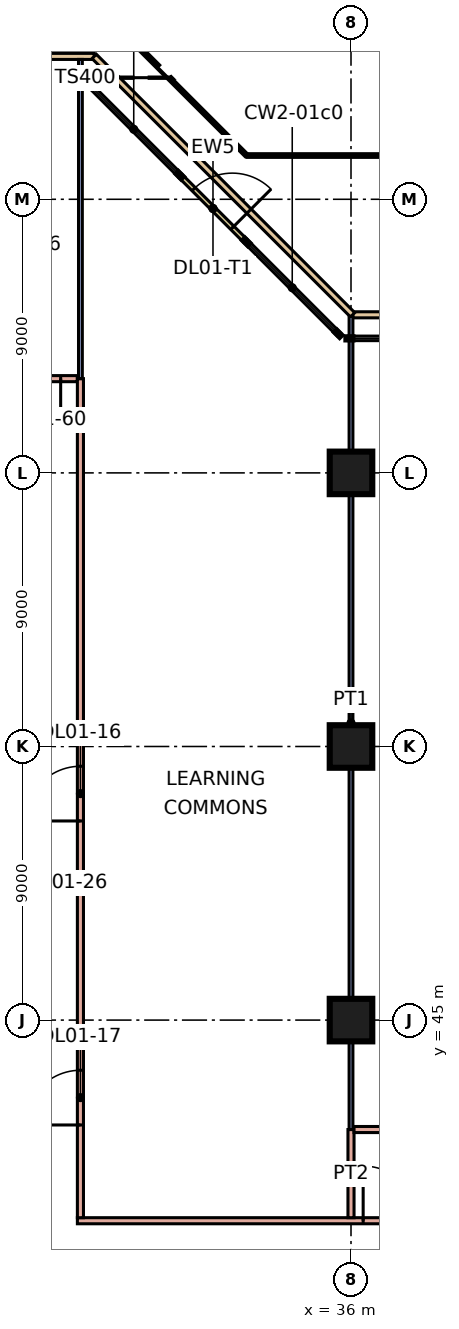
"""IFC4 building model, lengths in metres.
Left out: names, types, materials, properties, quantities, classifications, styles, units other than length and angle.
Written with IfcOpenShell. Run it as: python <this file> out.ifc"""

import sys

from ifc_helpers import new_model, si_unit, direction, frame, frame_2d, origin, origin_2d, place, context, subcontext, project, spatial, rectangle, extrude, element, fill, save


model = new_model("IFC4")
c1 = context("Model", 3, precision=1e-05, world=origin(), true_north=direction((0.0, 1.0)))
c2 = subcontext(c1, "Body", "Model", "MODEL_VIEW")
j1 = project(units=[si_unit("LENGTHUNIT", "METRE"), si_unit("PLANEANGLEUNIT", "RADIAN")], contexts=[c1])
p1 = place(None, origin())
s1 = spatial("IfcSite", under=j1, at=p1, CompositionType="ELEMENT")
p2 = place(p1, origin())
s2 = spatial("IfcBuilding", under=s1, at=p2, CompositionType="ELEMENT")
p3 = place(p2, frame((0.0, 0.0, 7.2)))
s3 = spatial("IfcBuildingStorey", under=s2, at=p3, CompositionType="ELEMENT", Elevation=7.2)
for number, where, z_axis, x_axis in (
    (1, (36.0, 45.0, 0.0), (0.0, 0.0, 1.0), (1.0, 0.0, 0.0)),
    (2, (36.0, 54.0, 0.0), (0.0, 0.0, 1.0), (1.0, 0.0, 0.0)),
    (3, (36.0, 63.0, 0.0), (0.0, 0.0, 1.0), (1.0, 0.0, 0.0)),
):
    element("IfcColumn", number, at=place(p3, frame(where, z_axis=z_axis, x_axis=x_axis)), inside=s3, PredefinedType="COLUMN", context=c2, shape_type="SweptSolid", body=[
        extrude(rectangle(XDim=1.4, YDim=1.4, at=origin_2d()), origin(), (0.0, 0.0, 1.0), 4.8),
    ])
p4 = place(p3, frame((32.521, 70.636, 0.0), z_axis=(0.0, 0.0, 1.0), x_axis=(-0.707106781187, 0.707106781187, 0.0)))
e4 = element("IfcWall", 4, at=p4, inside=s3, PredefinedType="SOLIDWALL", context=c2, shape_type="SweptSolid", body=[
    extrude(rectangle(XDim=3.0, YDim=0.15, at=frame_2d((1.5, 0.0))), origin(), (0.0, 0.0, 1.0), 4.4),
])
p5 = place(p4, frame((0.6, 0.0, 0.0)))
e5 = element("IfcOpeningElement", 5, at=p5, cuts=e4, PredefinedType="OPENING", context=c2, shape_type="SweptSolid", body=[
    extrude(rectangle(XDim=1.8, YDim=2.4, at=frame_2d((0.9, 1.2))), frame((0.0, 0.085, 0.0), z_axis=(0.0, -1.0, 0.0), x_axis=(1.0, 0.0, 0.0)), (0.0, 0.0, 1.0), 0.17),
])
p6 = place(p3, frame((36.053, 68.2, 0.0), z_axis=(0.0, 0.0, 1.0), x_axis=(1.0, 0.0, 0.0)))
e6 = element("IfcWall", 6, at=p6, inside=s3, PredefinedType="PARAPET", context=c2, shape_type="SweptSolid", body=[
    extrude(rectangle(XDim=32.146, YDim=0.2, at=frame_2d((16.073, 0.0))), origin(), (0.0, 0.0, 1.0), 0.5),
])
p7 = place(p3, frame((-3.553, 76.7, 0.0), z_axis=(0.0, 0.0, 1.0), x_axis=(1.0, 0.0, 0.0)))
e7 = element("IfcWall", 7, at=p7, inside=s3, PredefinedType="PARAPET", context=c2, shape_type="SweptSolid", body=[
    extrude(rectangle(XDim=31.107, YDim=0.2, at=frame_2d((15.553, 0.0))), origin(), (0.0, 0.0, 1.0), 0.5),
])
p8 = place(p3, frame((27.553, 76.7, 0.0), z_axis=(0.0, 0.0, 1.0), x_axis=(0.707106781187, -0.707106781187, 0.0)))
e8 = element("IfcWall", 8, at=p8, inside=s3, PredefinedType="PARAPET", context=c2, shape_type="SweptSolid", body=[
    extrude(rectangle(XDim=12.021, YDim=0.2, at=frame_2d((6.01, 0.0))), origin(), (0.0, 0.0, 1.0), 0.5),
])
p9 = place(p3, frame((-3.0, 66.1, 0.0), z_axis=(0.0, 0.0, 1.0), x_axis=(1.0, 0.0, 0.0)))
e9 = element("IfcWall", 9, at=p9, inside=s3, PredefinedType="PARTITIONING", context=c2, shape_type="SweptSolid", body=[
    extrude(rectangle(XDim=30.0, YDim=0.2, at=frame_2d((15.0, 0.0))), origin(), (0.0, 0.0, 1.0), 4.4),
])
p10 = place(p9, frame((0.65, 0.0, 0.0)))
e10 = element("IfcOpeningElement", 10, at=p10, cuts=e9, PredefinedType="OPENING", context=c2, shape_type="SweptSolid", body=[
    extrude(rectangle(XDim=1.0, YDim=2.1, at=frame_2d((0.5, 1.05))), frame((0.0, 0.11, 0.0), z_axis=(0.0, -1.0, 0.0), x_axis=(1.0, 0.0, 0.0)), (0.0, 0.0, 1.0), 0.22),
])
p11 = place(p9, frame((8.6, 0.0, 0.0)))
e11 = element("IfcOpeningElement", 11, at=p11, cuts=e9, PredefinedType="OPENING", context=c2, shape_type="SweptSolid", body=[
    extrude(rectangle(XDim=1.0, YDim=2.1, at=frame_2d((0.5, 1.05))), frame((0.0, 0.11, 0.0), z_axis=(0.0, -1.0, 0.0), x_axis=(1.0, 0.0, 0.0)), (0.0, 0.0, 1.0), 0.22),
])
p12 = place(p9, frame((13.85, 0.0, 0.0)))
e12 = element("IfcOpeningElement", 12, at=p12, cuts=e9, PredefinedType="OPENING", context=c2, shape_type="SweptSolid", body=[
    extrude(rectangle(XDim=1.0, YDim=2.1, at=frame_2d((0.5, 1.05))), frame((0.0, 0.11, 0.0), z_axis=(0.0, -1.0, 0.0), x_axis=(1.0, 0.0, 0.0)), (0.0, 0.0, 1.0), 0.22),
])
p13 = place(p9, frame((22.35, 0.0, 0.0)))
e13 = element("IfcOpeningElement", 13, at=p13, cuts=e9, PredefinedType="OPENING", context=c2, shape_type="SweptSolid", body=[
    extrude(rectangle(XDim=1.0, YDim=2.1, at=frame_2d((0.5, 1.05))), frame((0.0, 0.11, 0.0), z_axis=(0.0, -1.0, 0.0), x_axis=(1.0, 0.0, 0.0)), (0.0, 0.0, 1.0), 0.22),
])
p14 = place(p9, frame((25.85, 0.0, 0.0)))
e14 = element("IfcOpeningElement", 14, at=p14, cuts=e9, PredefinedType="OPENING", context=c2, shape_type="SweptSolid", body=[
    extrude(rectangle(XDim=1.0, YDim=2.1, at=frame_2d((0.5, 1.05))), frame((0.0, 0.11, 0.0), z_axis=(0.0, -1.0, 0.0), x_axis=(1.0, 0.0, 0.0)), (0.0, 0.0, 1.0), 0.22),
])
p15 = place(p9, frame((28.45, 0.0, 0.0)))
e15 = element("IfcOpeningElement", 15, at=p15, cuts=e9, PredefinedType="OPENING", context=c2, shape_type="SweptSolid", body=[
    extrude(rectangle(XDim=1.0, YDim=2.1, at=frame_2d((0.5, 1.05))), frame((0.0, 0.11, 0.0), z_axis=(0.0, -1.0, 0.0), x_axis=(1.0, 0.0, 0.0)), (0.0, 0.0, 1.0), 0.22),
])
p16 = place(p3, frame((27.0, 38.4, 0.0), z_axis=(0.0, 0.0, 1.0), x_axis=(1.0, 0.0, 0.0)))
e16 = element("IfcWall", 16, at=p16, inside=s3, PredefinedType="PARTITIONING", context=c2, shape_type="SweptSolid", body=[
    extrude(rectangle(XDim=41.1, YDim=0.2, at=frame_2d((20.55, 0.0))), origin(), (0.0, 0.0, 1.0), 4.4),
])
p17 = place(p16, frame((21.9, 0.0, 0.0)))
e17 = element("IfcOpeningElement", 17, at=p17, cuts=e16, PredefinedType="OPENING", context=c2, shape_type="SweptSolid", body=[
    extrude(rectangle(XDim=1.0, YDim=2.1, at=frame_2d((0.5, 1.05))), frame((0.0, 0.11, 0.0), z_axis=(0.0, -1.0, 0.0), x_axis=(1.0, 0.0, 0.0)), (0.0, 0.0, 1.0), 0.22),
])
p18 = place(p16, frame((30.9, 0.0, 0.0)))
e18 = element("IfcOpeningElement", 18, at=p18, cuts=e16, PredefinedType="OPENING", context=c2, shape_type="SweptSolid", body=[
    extrude(rectangle(XDim=1.0, YDim=2.1, at=frame_2d((0.5, 1.05))), frame((0.0, 0.11, 0.0), z_axis=(0.0, -1.0, 0.0), x_axis=(1.0, 0.0, 0.0)), (0.0, 0.0, 1.0), 0.22),
])
p19 = place(p16, frame((37.65, 0.0, 0.0)))
e19 = element("IfcOpeningElement", 19, at=p19, cuts=e16, PredefinedType="OPENING", context=c2, shape_type="SweptSolid", body=[
    extrude(rectangle(XDim=1.0, YDim=2.1, at=frame_2d((0.5, 1.05))), frame((0.0, 0.11, 0.0), z_axis=(0.0, -1.0, 0.0), x_axis=(1.0, 0.0, 0.0)), (0.0, 0.0, 1.0), 0.22),
])
p20 = place(p16, frame((9.4, 0.0, 0.0)))
e20 = element("IfcOpeningElement", 20, at=p20, cuts=e16, PredefinedType="OPENING", context=c2, shape_type="SweptSolid", body=[
    extrude(rectangle(XDim=1.8, YDim=2.1, at=frame_2d((0.9, 1.05))), frame((0.0, 0.11, 0.0), z_axis=(0.0, -1.0, 0.0), x_axis=(1.0, 0.0, 0.0)), (0.0, 0.0, 1.0), 0.22),
])
p21 = place(p3, frame((27.1, 38.5, 0.0), z_axis=(0.0, 0.0, 1.0), x_axis=(0.0, 1.0, 0.0)))
e21 = element("IfcWall", 21, at=p21, inside=s3, PredefinedType="PARTITIONING", context=c2, shape_type="SweptSolid", body=[
    extrude(rectangle(XDim=27.6, YDim=0.2, at=frame_2d((13.8, 0.0))), origin(), (0.0, 0.0, 1.0), 4.4),
])
p22 = place(p21, frame((13.05, 0.0, 0.0)))
e22 = element("IfcOpeningElement", 22, at=p22, cuts=e21, PredefinedType="OPENING", context=c2, shape_type="SweptSolid", body=[
    extrude(rectangle(XDim=1.8, YDim=2.1, at=frame_2d((0.9, 1.05))), frame((0.0, 0.11, 0.0), z_axis=(0.0, -1.0, 0.0), x_axis=(1.0, 0.0, 0.0)), (0.0, 0.0, 1.0), 0.22),
])
p23 = place(p21, frame((3.05, 0.0, 0.0)))
e23 = element("IfcOpeningElement", 23, at=p23, cuts=e21, PredefinedType="OPENING", context=c2, shape_type="SweptSolid", body=[
    extrude(rectangle(XDim=1.8, YDim=2.1, at=frame_2d((0.9, 1.05))), frame((0.0, 0.11, 0.0), z_axis=(0.0, -1.0, 0.0), x_axis=(1.0, 0.0, 0.0)), (0.0, 0.0, 1.0), 0.22),
])
p24 = place(p3, frame((27.1, 66.1, 0.0), z_axis=(0.0, 0.0, 1.0), x_axis=(0.0, 1.0, 0.0)))
e24 = element("IfcWall", 24, at=p24, inside=s3, PredefinedType="PARTITIONING", context=c2, shape_type="SweptSolid", body=[
    extrude(rectangle(XDim=10.5, YDim=0.125, at=frame_2d((5.25, 0.0))), origin(), (0.0, 0.0, 1.0), 4.4),
])
p25 = place(p3, frame((36.0, 38.5, 0.0), z_axis=(0.0, 0.0, 1.0), x_axis=(0.0, 1.0, 0.0)))
e25 = element("IfcWall", 25, at=p25, inside=s3, PredefinedType="PARTITIONING", context=c2, shape_type="SweptSolid", body=[
    extrude(rectangle(XDim=2.9, YDim=0.2, at=frame_2d((1.45, 0.0))), origin(), (0.0, 0.0, 1.0), 4.4),
])
p26 = place(p3, frame((36.0, 41.4, 0.0), z_axis=(0.0, 0.0, 1.0), x_axis=(0.0, 1.0, 0.0)))
e26 = element("IfcWall", 26, at=p26, inside=s3, PredefinedType="PARTITIONING", context=c2, shape_type="SweptSolid", body=[
    extrude(rectangle(XDim=26.747, YDim=0.125, at=frame_2d((13.373, 0.0))), origin(), (0.0, 0.0, 1.0), 4.4),
])
p27 = place(p3, frame((36.1, 41.4, 0.0), z_axis=(0.0, 0.0, 1.0), x_axis=(1.0, 0.0, 0.0)))
e27 = element("IfcWall", 27, at=p27, inside=s3, PredefinedType="PARTITIONING", context=c2, shape_type="SweptSolid", body=[
    extrude(rectangle(XDim=32.0, YDim=0.2, at=frame_2d((16.0, 0.0))), origin(), (0.0, 0.0, 1.0), 4.4),
])
p28 = place(p27, frame((3.45, 0.0, 0.0)))
e28 = element("IfcOpeningElement", 28, at=p28, cuts=e27, PredefinedType="OPENING", context=c2, shape_type="SweptSolid", body=[
    extrude(rectangle(XDim=1.8, YDim=2.1, at=frame_2d((0.9, 1.05))), frame((0.0, 0.11, 0.0), z_axis=(0.0, -1.0, 0.0), x_axis=(1.0, 0.0, 0.0)), (0.0, 0.0, 1.0), 0.22),
])
p29 = place(p27, frame((6.95, 0.0, 0.0)))
e29 = element("IfcOpeningElement", 29, at=p29, cuts=e27, PredefinedType="OPENING", context=c2, shape_type="SweptSolid", body=[
    extrude(rectangle(XDim=1.8, YDim=2.1, at=frame_2d((0.9, 1.05))), frame((0.0, 0.11, 0.0), z_axis=(0.0, -1.0, 0.0), x_axis=(1.0, 0.0, 0.0)), (0.0, 0.0, 1.0), 0.22),
])
p30 = place(p27, frame((12.45, 0.0, 0.0)))
e30 = element("IfcOpeningElement", 30, at=p30, cuts=e27, PredefinedType="OPENING", context=c2, shape_type="SweptSolid", body=[
    extrude(rectangle(XDim=1.8, YDim=2.1, at=frame_2d((0.9, 1.05))), frame((0.0, 0.11, 0.0), z_axis=(0.0, -1.0, 0.0), x_axis=(1.0, 0.0, 0.0)), (0.0, 0.0, 1.0), 0.22),
])
p31 = place(p27, frame((15.95, 0.0, 0.0)))
e31 = element("IfcOpeningElement", 31, at=p31, cuts=e27, PredefinedType="OPENING", context=c2, shape_type="SweptSolid", body=[
    extrude(rectangle(XDim=1.8, YDim=2.1, at=frame_2d((0.9, 1.05))), frame((0.0, 0.11, 0.0), z_axis=(0.0, -1.0, 0.0), x_axis=(1.0, 0.0, 0.0)), (0.0, 0.0, 1.0), 0.22),
])
p32 = place(p27, frame((21.45, 0.0, 0.0)))
e32 = element("IfcOpeningElement", 32, at=p32, cuts=e27, PredefinedType="OPENING", context=c2, shape_type="SweptSolid", body=[
    extrude(rectangle(XDim=1.8, YDim=2.1, at=frame_2d((0.9, 1.05))), frame((0.0, 0.11, 0.0), z_axis=(0.0, -1.0, 0.0), x_axis=(1.0, 0.0, 0.0)), (0.0, 0.0, 1.0), 0.22),
])
p33 = place(p27, frame((24.95, 0.0, 0.0)))
e33 = element("IfcOpeningElement", 33, at=p33, cuts=e27, PredefinedType="OPENING", context=c2, shape_type="SweptSolid", body=[
    extrude(rectangle(XDim=1.8, YDim=2.1, at=frame_2d((0.9, 1.05))), frame((0.0, 0.11, 0.0), z_axis=(0.0, -1.0, 0.0), x_axis=(1.0, 0.0, 0.0)), (0.0, 0.0, 1.0), 0.22),
])
p34 = place(p27, frame((28.675, 0.0, 0.0)))
e34 = element("IfcOpeningElement", 34, at=p34, cuts=e27, PredefinedType="OPENING", context=c2, shape_type="SweptSolid", body=[
    extrude(rectangle(XDim=1.0, YDim=2.1, at=frame_2d((0.5, 1.05))), frame((0.0, 0.11, 0.0), z_axis=(0.0, -1.0, 0.0), x_axis=(1.0, 0.0, 0.0)), (0.0, 0.0, 1.0), 0.22),
])
p35 = place(p5, frame((1.8, 0.0, 0.0), z_axis=(0.0, 0.0, 1.0), x_axis=(-1.0, 0.0, 0.0)))
e35 = element("IfcDoor", 35, at=p35, inside=s3, OperationType="DOUBLE_DOOR_SINGLE_SWING", PredefinedType="DOOR", context=c2, shape_type="SweptSolid", body=[
    extrude(rectangle(XDim=1.8, YDim=2.4, at=frame_2d((0.9, 1.2))), frame((0.0, 0.025, 0.0), z_axis=(0.0, -1.0, 0.0), x_axis=(1.0, 0.0, 0.0)), (0.0, 0.0, 1.0), 0.05),
])
fill(e5, e35)
p36 = place(p22, origin())
e36 = element("IfcDoor", 36, at=p36, inside=s3, OperationType="DOUBLE_DOOR_SINGLE_SWING", PredefinedType="DOOR", context=c2, shape_type="SweptSolid", body=[
    extrude(rectangle(XDim=1.8, YDim=2.1, at=frame_2d((0.9, 1.05))), frame((0.0, 0.025, 0.0), z_axis=(0.0, -1.0, 0.0), x_axis=(1.0, 0.0, 0.0)), (0.0, 0.0, 1.0), 0.05),
])
fill(e22, e36)
p37 = place(p23, origin())
e37 = element("IfcDoor", 37, at=p37, inside=s3, OperationType="DOUBLE_DOOR_SINGLE_SWING", PredefinedType="DOOR", context=c2, shape_type="SweptSolid", body=[
    extrude(rectangle(XDim=1.8, YDim=2.1, at=frame_2d((0.9, 1.05))), frame((0.0, 0.025, 0.0), z_axis=(0.0, -1.0, 0.0), x_axis=(1.0, 0.0, 0.0)), (0.0, 0.0, 1.0), 0.05),
])
fill(e23, e37)
p38 = place(p20, origin())
e38 = element("IfcDoor", 38, at=p38, inside=s3, OperationType="DOUBLE_DOOR_SINGLE_SWING", PredefinedType="DOOR", context=c2, shape_type="SweptSolid", body=[
    extrude(rectangle(XDim=1.8, YDim=2.1, at=frame_2d((0.9, 1.05))), frame((0.0, 0.025, 0.0), z_axis=(0.0, -1.0, 0.0), x_axis=(1.0, 0.0, 0.0)), (0.0, 0.0, 1.0), 0.05),
])
fill(e20, e38)
p39 = place(p15, origin())
e39 = element("IfcDoor", 39, at=p39, inside=s3, OperationType="SINGLE_SWING_RIGHT", PredefinedType="DOOR", context=c2, shape_type="SweptSolid", body=[
    extrude(rectangle(XDim=1.0, YDim=2.1, at=frame_2d((0.5, 1.05))), frame((0.0, 0.025, 0.0), z_axis=(0.0, -1.0, 0.0), x_axis=(1.0, 0.0, 0.0)), (0.0, 0.0, 1.0), 0.05),
])
fill(e15, e39)
save(model, sys.argv[1])
